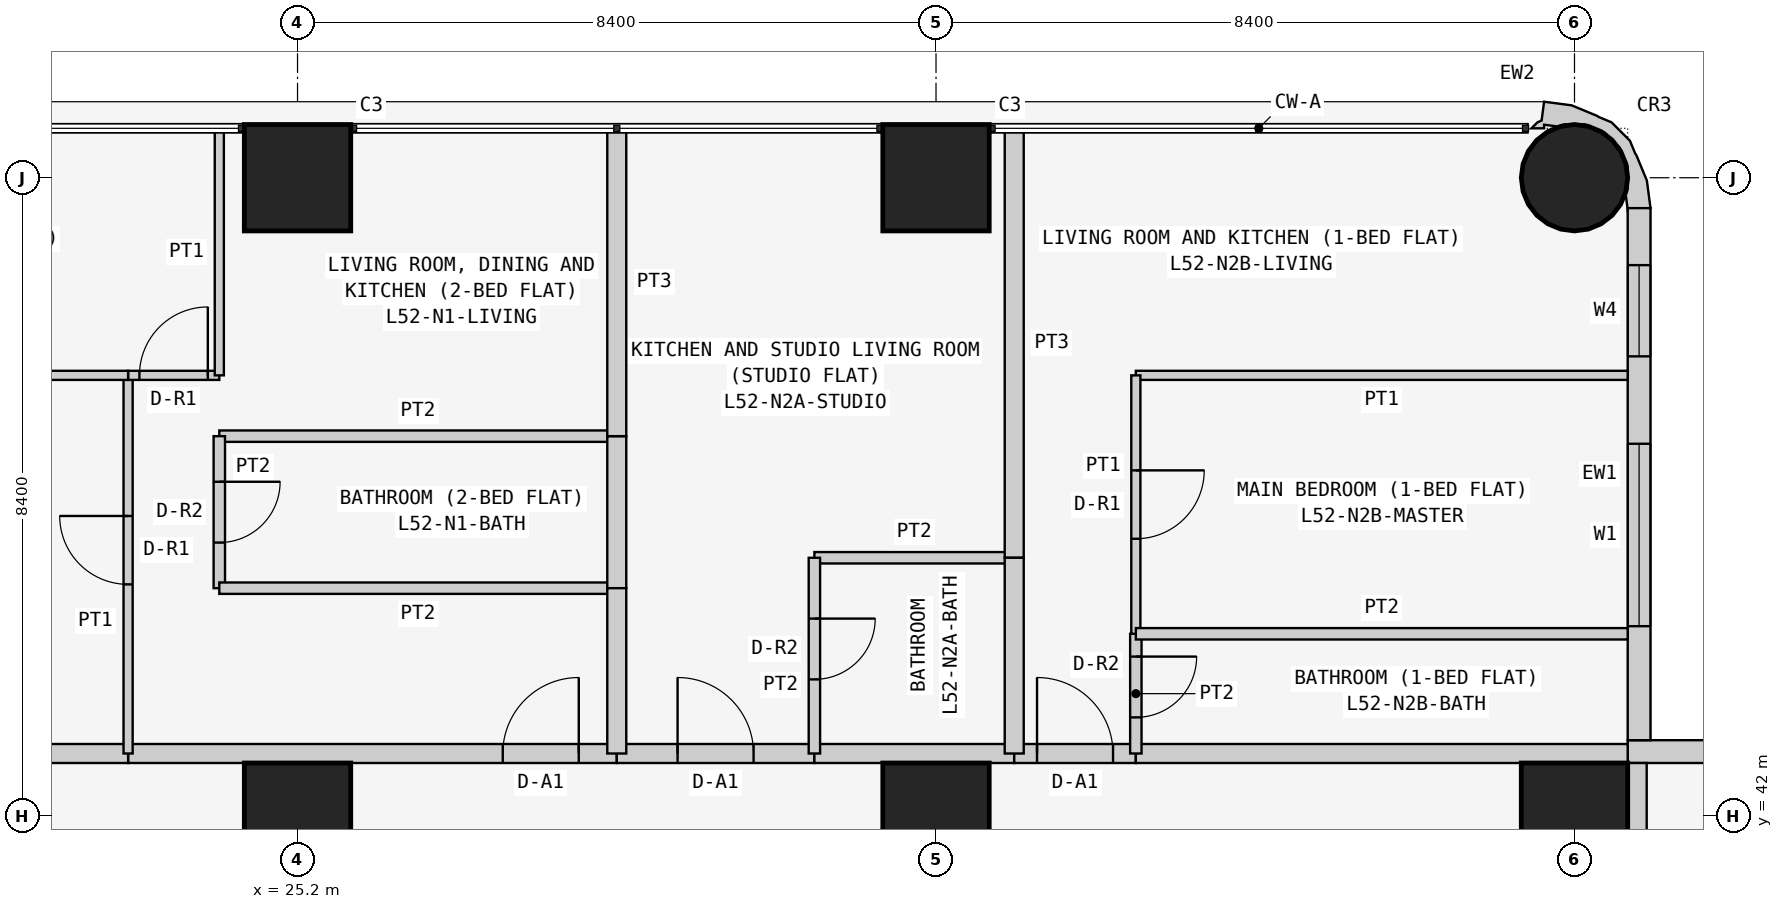
"""IFC4 building model, lengths in metres.
Left out: names, types, materials, properties, quantities, classifications, styles, units other than length and angle.
Written with IfcOpenShell. Run it as: python <this file> out.ifc"""

import sys

from ifc_helpers import new_model, si_unit, direction, frame, frame_2d, origin, origin_2d, place, context, subcontext, project, spatial, polyline, rectangle, circle, outline, extrude, element, fill, save


model = new_model("IFC4")
c1 = context("Model", 3, precision=1e-05, world=origin(), true_north=direction((0.0, 1.0)))
c2 = subcontext(c1, "Body", "Model", "MODEL_VIEW")
j1 = project(units=[si_unit("LENGTHUNIT", "METRE"), si_unit("PLANEANGLEUNIT", "RADIAN")], contexts=[c1])
p1 = place(None, origin())
s1 = spatial("IfcSite", under=j1, at=p1, CompositionType="ELEMENT")
p2 = place(p1, origin())
s2 = spatial("IfcBuilding", under=s1, at=p2, CompositionType="ELEMENT")
p3 = place(p2, frame((0.0, 0.0, 201.3)))
s3 = spatial("IfcBuildingStorey", under=s2, at=p3, CompositionType="ELEMENT", Elevation=201.3)
for number, where, z_axis, x_axis in (
    (1, (25.2, 42.0, 0.0), (0.0, 0.0, 1.0), (1.0, 0.0, 0.0)),
    (2, (25.2, 50.4, 0.0), (0.0, 0.0, 1.0), (1.0, 0.0, 0.0)),
    (3, (33.6, 42.0, 0.0), (0.0, 0.0, 1.0), (1.0, 0.0, 0.0)),
    (4, (33.6, 50.4, 0.0), (0.0, 0.0, 1.0), (1.0, 0.0, 0.0)),
    (5, (42.0, 42.0, 0.0), (0.0, 0.0, 1.0), (1.0, 0.0, 0.0)),
):
    element("IfcColumn", number, at=place(p3, frame(where, z_axis=z_axis, x_axis=x_axis)), inside=s3, PredefinedType="COLUMN", context=c2, shape_type="SweptSolid", body=[
        extrude(rectangle(XDim=1.4, YDim=1.4, at=origin_2d()), origin(), (0.0, 0.0, 1.0), 3.6),
    ])
p4 = place(p3, frame((42.0, 50.4, 0.0), z_axis=(0.0, 0.0, 1.0), x_axis=(1.0, 0.0, 0.0)))
e6 = element("IfcColumn", 6, at=p4, inside=s3, PredefinedType="COLUMN", context=c2, shape_type="SweptSolid", body=[
    extrude(circle(Radius=0.7, at=origin_2d()), origin(), (0.0, 0.0, 1.0), 3.6),
])
p5 = place(p3, frame((50.0, 42.85, 0.0), z_axis=(0.0, 0.0, 1.0), x_axis=(-1.0, 0.0, 0.0)))
e7 = element("IfcWall", 7, at=p5, inside=s3, PredefinedType="SOLIDWALL", context=c2, shape_type="SweptSolid", body=[
    extrude(rectangle(XDim=7.3, YDim=0.3, at=frame_2d((3.65, 0.0))), origin(), (0.0, 0.0, 1.0), 3.45),
])
p6 = place(p5, frame((3.1, 0.0, 0.9)))
e8 = element("IfcOpeningElement", 8, at=p6, cuts=e7, PredefinedType="OPENING", context=c2, shape_type="SweptSolid", body=[
    extrude(rectangle(XDim=2.4, YDim=1.5, at=frame_2d((1.2, 0.75))), frame((0.0, 0.16, 0.0), z_axis=(0.0, -1.0, 0.0), x_axis=(1.0, 0.0, 0.0)), (0.0, 0.0, 1.0), 0.32),
])
p7 = place(p5, frame((0.75, 0.0, 0.9)))
e9 = element("IfcOpeningElement", 9, at=p7, cuts=e7, PredefinedType="OPENING", context=c2, shape_type="SweptSolid", body=[
    extrude(rectangle(XDim=1.2, YDim=1.5, at=frame_2d((0.6, 0.75))), frame((0.0, 0.16, 0.0), z_axis=(0.0, -1.0, 0.0), x_axis=(1.0, 0.0, 0.0)), (0.0, 0.0, 1.0), 0.32),
])
p8 = place(p3, frame((42.85, 43.0, 0.0), z_axis=(0.0, 0.0, 1.0), x_axis=(0.0, 1.0, 0.0)))
e10 = element("IfcWall", 10, at=p8, inside=s3, PredefinedType="SOLIDWALL", context=c2, shape_type="SweptSolid", body=[
    extrude(rectangle(XDim=7.0, YDim=0.3, at=frame_2d((3.5, 0.0))), origin(), (0.0, 0.0, 1.0), 3.45),
])
p9 = place(p8, frame((1.5, 0.0, 0.9)))
e11 = element("IfcOpeningElement", 11, at=p9, cuts=e10, PredefinedType="OPENING", context=c2, shape_type="SweptSolid", body=[
    extrude(rectangle(XDim=2.4, YDim=1.5, at=frame_2d((1.2, 0.75))), frame((0.0, 0.16, 0.0), z_axis=(0.0, -1.0, 0.0), x_axis=(1.0, 0.0, 0.0)), (0.0, 0.0, 1.0), 0.32),
])
p10 = place(p8, frame((5.05, 0.0, 0.9)))
e12 = element("IfcOpeningElement", 12, at=p10, cuts=e10, PredefinedType="OPENING", context=c2, shape_type="SweptSolid", body=[
    extrude(rectangle(XDim=1.2, YDim=1.5, at=frame_2d((0.6, 0.75))), frame((0.0, 0.16, 0.0), z_axis=(0.0, -1.0, 0.0), x_axis=(1.0, 0.0, 0.0)), (0.0, 0.0, 1.0), 0.32),
])
p11 = place(p3, frame((42.724, 50.11, 0.0), z_axis=(0.0, 0.0, 1.0), x_axis=(0.439933741929, 0.898030234854, 0.0)))
e13 = element("IfcWall", 13, at=p11, inside=s3, PredefinedType="SOLIDWALL", context=c2, shape_type="SweptSolid", body=[
    extrude(outline(polyline([(-0.145, -0.044), (0.022, -0.296), (0.327, -0.094), (0.568, 0.18), (0.577, 0.199), (0.7, 0.337), (0.811, 0.661), (0.799, 0.845), (0.803, 0.866), (0.78, 1.231), (0.664, 1.577), (0.426, 1.497), (0.382, 1.536), (0.276, 1.572), (0.349, 1.423), (0.392, 1.444), (0.453, 1.261), (0.51, 1.211), (0.632, 0.961), (0.65, 0.683), (0.56, 0.419), (0.375, 0.21), (0.125, 0.087), (0.05, 0.082), (-0.127, -0.035), (-0.145, -0.044)])), origin(), (0.0, 0.0, 1.0), 3.45),
])
p12 = place(p3, frame((22.971, 42.825, 0.0), z_axis=(0.0, 0.0, 1.0), x_axis=(1.0, 0.0, 0.0)))
e14 = element("IfcWall", 14, at=p12, inside=s3, PredefinedType="PARTITIONING", context=c2, shape_type="SweptSolid", body=[
    extrude(rectangle(XDim=6.429, YDim=0.25, at=frame_2d((3.214, 0.0))), origin(), (0.0, 0.0, 1.0), 3.45),
])
p13 = place(p12, frame((4.929, 0.0, 0.0)))
e15 = element("IfcOpeningElement", 15, at=p13, cuts=e14, PredefinedType="OPENING", context=c2, shape_type="SweptSolid", body=[
    extrude(rectangle(XDim=1.0, YDim=2.1, at=frame_2d((0.5, 1.05))), frame((0.0, 0.135, 0.0), z_axis=(0.0, -1.0, 0.0), x_axis=(1.0, 0.0, 0.0)), (0.0, 0.0, 1.0), 0.27),
])
p14 = place(p3, frame((16.1, 42.825, 0.0), z_axis=(0.0, 0.0, 1.0), x_axis=(1.0, 0.0, 0.0)))
e16 = element("IfcWall", 16, at=p14, inside=s3, PredefinedType="PARTITIONING", context=c2, shape_type="SweptSolid", body=[
    extrude(rectangle(XDim=6.871, YDim=0.25, at=frame_2d((3.436, 0.0))), origin(), (0.0, 0.0, 1.0), 3.45),
])
p15 = place(p3, frame((29.4, 42.825, 0.0), z_axis=(0.0, 0.0, 1.0), x_axis=(1.0, 0.0, 0.0)))
e17 = element("IfcWall", 17, at=p15, inside=s3, PredefinedType="PARTITIONING", context=c2, shape_type="SweptSolid", body=[
    extrude(rectangle(XDim=2.6, YDim=0.25, at=frame_2d((1.3, 0.0))), origin(), (0.0, 0.0, 1.0), 3.45),
])
p16 = place(p15, frame((0.8, 0.0, 0.0)))
e18 = element("IfcOpeningElement", 18, at=p16, cuts=e17, PredefinedType="OPENING", context=c2, shape_type="SweptSolid", body=[
    extrude(rectangle(XDim=1.0, YDim=2.1, at=frame_2d((0.5, 1.05))), frame((0.0, 0.135, 0.0), z_axis=(0.0, -1.0, 0.0), x_axis=(1.0, 0.0, 0.0)), (0.0, 0.0, 1.0), 0.27),
])
p17 = place(p3, frame((32.0, 42.825, 0.0), z_axis=(0.0, 0.0, 1.0), x_axis=(1.0, 0.0, 0.0)))
e19 = element("IfcWall", 19, at=p17, inside=s3, PredefinedType="PARTITIONING", context=c2, shape_type="SweptSolid", body=[
    extrude(rectangle(XDim=2.629, YDim=0.25, at=frame_2d((1.314, 0.0))), origin(), (0.0, 0.0, 1.0), 3.45),
])
p18 = place(p3, frame((34.629, 42.825, 0.0), z_axis=(0.0, 0.0, 1.0), x_axis=(1.0, 0.0, 0.0)))
e20 = element("IfcWall", 20, at=p18, inside=s3, PredefinedType="PARTITIONING", context=c2, shape_type="SweptSolid", body=[
    extrude(rectangle(XDim=1.6, YDim=0.25, at=frame_2d((0.8, 0.0))), origin(), (0.0, 0.0, 1.0), 3.45),
])
p19 = place(p18, frame((0.3, 0.0, 0.0)))
e21 = element("IfcOpeningElement", 21, at=p19, cuts=e20, PredefinedType="OPENING", context=c2, shape_type="SweptSolid", body=[
    extrude(rectangle(XDim=1.0, YDim=2.1, at=frame_2d((0.5, 1.05))), frame((0.0, 0.135, 0.0), z_axis=(0.0, -1.0, 0.0), x_axis=(1.0, 0.0, 0.0)), (0.0, 0.0, 1.0), 0.27),
])
p20 = place(p3, frame((36.229, 42.825, 0.0), z_axis=(0.0, 0.0, 1.0), x_axis=(1.0, 0.0, 0.0)))
e22 = element("IfcWall", 22, at=p20, inside=s3, PredefinedType="PARTITIONING", context=c2, shape_type="SweptSolid", body=[
    extrude(rectangle(XDim=6.471, YDim=0.25, at=frame_2d((3.235, 0.0))), origin(), (0.0, 0.0, 1.0), 3.45),
])
p21 = place(p3, frame((42.825, 42.7, 0.0), z_axis=(0.0, 0.0, 1.0), x_axis=(0.0, -1.0, 0.0)))
e23 = element("IfcWall", 23, at=p21, inside=s3, PredefinedType="PARTITIONING", context=c2, shape_type="SweptSolid", body=[
    extrude(rectangle(XDim=6.871, YDim=0.25, at=frame_2d((3.436, 0.0))), origin(), (0.0, 0.0, 1.0), 3.45),
])
p22 = place(p3, frame((29.4, 47.0, 0.0), z_axis=(0.0, 0.0, 1.0), x_axis=(-1.0, 0.0, 0.0)))
e24 = element("IfcWall", 24, at=p22, inside=s3, PredefinedType="PARTITIONING", context=c2, shape_type="SweptSolid", body=[
    extrude(rectangle(XDim=5.229, YDim=0.15, at=frame_2d((2.615, 0.0))), origin(), (0.0, 0.0, 1.0), 3.45),
])
p23 = place(p3, frame((24.171, 47.0, 0.0), z_axis=(0.0, 0.0, 1.0), x_axis=(0.0, -1.0, 0.0)))
e25 = element("IfcWall", 25, at=p23, inside=s3, PredefinedType="PARTITIONING", context=c2, shape_type="SweptSolid", body=[
    extrude(rectangle(XDim=2.0, YDim=0.15, at=frame_2d((1.0, 0.0))), origin(), (0.0, 0.0, 1.0), 3.45),
])
p24 = place(p23, frame((0.6, 0.0, 0.0)))
e26 = element("IfcOpeningElement", 26, at=p24, cuts=e25, PredefinedType="OPENING", context=c2, shape_type="SweptSolid", body=[
    extrude(rectangle(XDim=0.8, YDim=2.1, at=frame_2d((0.4, 1.05))), frame((0.0, 0.085, 0.0), z_axis=(0.0, -1.0, 0.0), x_axis=(1.0, 0.0, 0.0)), (0.0, 0.0, 1.0), 0.17),
])
p25 = place(p3, frame((24.171, 45.0, 0.0), z_axis=(0.0, 0.0, 1.0), x_axis=(1.0, 0.0, 0.0)))
e27 = element("IfcWall", 27, at=p25, inside=s3, PredefinedType="PARTITIONING", context=c2, shape_type="SweptSolid", body=[
    extrude(rectangle(XDim=5.229, YDim=0.15, at=frame_2d((2.615, 0.0))), origin(), (0.0, 0.0, 1.0), 3.45),
])
p26 = place(p3, frame((29.4, 45.0, 0.0), z_axis=(0.0, 0.0, 1.0), x_axis=(0.0, 1.0, 0.0)))
e28 = element("IfcWall", 28, at=p26, inside=s3, PredefinedType="PARTITIONING", context=c2, shape_type="SweptSolid", body=[
    extrude(rectangle(XDim=2.0, YDim=0.25, at=frame_2d((1.0, 0.0))), origin(), (0.0, 0.0, 1.0), 2.848),
])
p27 = place(p3, frame((22.971, 42.825, 0.0), z_axis=(0.0, 0.0, 1.0), x_axis=(0.0, 1.0, 0.0)))
e29 = element("IfcWall", 29, at=p27, inside=s3, PredefinedType="PARTITIONING", context=c2, shape_type="SweptSolid", body=[
    extrude(rectangle(XDim=4.975, YDim=0.12, at=frame_2d((2.488, 0.0))), origin(), (0.0, 0.0, 1.0), 3.45),
])
p28 = place(p27, frame((2.225, 0.0, 0.0)))
e30 = element("IfcOpeningElement", 30, at=p28, cuts=e29, PredefinedType="OPENING", context=c2, shape_type="SweptSolid", body=[
    extrude(rectangle(XDim=0.9, YDim=2.1, at=frame_2d((0.45, 1.05))), frame((0.0, 0.07, 0.0), z_axis=(0.0, -1.0, 0.0), x_axis=(1.0, 0.0, 0.0)), (0.0, 0.0, 1.0), 0.14),
])
p29 = place(p3, frame((22.971, 47.8, 0.0), z_axis=(0.0, 0.0, 1.0), x_axis=(1.0, 0.0, 0.0)))
e31 = element("IfcWall", 31, at=p29, inside=s3, PredefinedType="PARTITIONING", context=c2, shape_type="SweptSolid", body=[
    extrude(rectangle(XDim=1.2, YDim=0.12, at=frame_2d((0.6, 0.0))), origin(), (0.0, 0.0, 1.0), 3.45),
])
p30 = place(p29, frame((0.149, 0.0, 0.0)))
e32 = element("IfcOpeningElement", 32, at=p30, cuts=e31, PredefinedType="OPENING", context=c2, shape_type="SweptSolid", body=[
    extrude(rectangle(XDim=0.9, YDim=2.1, at=frame_2d((0.45, 1.05))), frame((0.0, 0.07, 0.0), z_axis=(0.0, -1.0, 0.0), x_axis=(1.0, 0.0, 0.0)), (0.0, 0.0, 1.0), 0.14),
])
p31 = place(p3, frame((24.171, 47.8, 0.0), z_axis=(0.0, 0.0, 1.0), x_axis=(0.0, 1.0, 0.0)))
e33 = element("IfcWall", 33, at=p31, inside=s3, PredefinedType="PARTITIONING", context=c2, shape_type="SweptSolid", body=[
    extrude(rectangle(XDim=3.25, YDim=0.12, at=frame_2d((1.625, 0.0))), origin(), (0.0, 0.0, 1.0), 3.45),
])
p32 = place(p3, frame((29.4, 45.0, 0.0), z_axis=(0.0, 0.0, 1.0), x_axis=(0.0, -1.0, 0.0)))
e34 = element("IfcWall", 34, at=p32, inside=s3, PredefinedType="PARTITIONING", context=c2, shape_type="SweptSolid", body=[
    extrude(rectangle(XDim=2.175, YDim=0.25, at=frame_2d((1.087, 0.0))), origin(), (0.0, 0.0, 1.0), 2.848),
])
p33 = place(p3, frame((29.4, 51.05, 0.0), z_axis=(0.0, 0.0, 1.0), x_axis=(0.0, -1.0, 0.0)))
e35 = element("IfcWall", 35, at=p33, inside=s3, PredefinedType="PARTITIONING", context=c2, shape_type="SweptSolid", body=[
    extrude(rectangle(XDim=4.05, YDim=0.25, at=frame_2d((2.025, 0.0))), origin(), (0.0, 0.0, 1.0), 2.848),
])
p34 = place(p3, frame((22.971, 47.8, 0.0), z_axis=(0.0, 0.0, 1.0), x_axis=(-1.0, 0.0, 0.0)))
e36 = element("IfcWall", 36, at=p34, inside=s3, PredefinedType="PARTITIONING", context=c2, shape_type="SweptSolid", body=[
    extrude(rectangle(XDim=6.871, YDim=0.12, at=frame_2d((3.436, 0.0))), origin(), (0.0, 0.0, 1.0), 3.45),
])
p35 = place(p3, frame((34.629, 45.4, 0.0), z_axis=(0.0, 0.0, 1.0), x_axis=(-1.0, 0.0, 0.0)))
e37 = element("IfcWall", 37, at=p35, inside=s3, PredefinedType="PARTITIONING", context=c2, shape_type="SweptSolid", body=[
    extrude(rectangle(XDim=2.629, YDim=0.15, at=frame_2d((1.314, 0.0))), origin(), (0.0, 0.0, 1.0), 3.45),
])
p36 = place(p3, frame((32.0, 45.4, 0.0), z_axis=(0.0, 0.0, 1.0), x_axis=(0.0, -1.0, 0.0)))
e38 = element("IfcWall", 38, at=p36, inside=s3, PredefinedType="PARTITIONING", context=c2, shape_type="SweptSolid", body=[
    extrude(rectangle(XDim=2.575, YDim=0.15, at=frame_2d((1.288, 0.0))), origin(), (0.0, 0.0, 1.0), 3.45),
])
p37 = place(p36, frame((0.8, 0.0, 0.0)))
e39 = element("IfcOpeningElement", 39, at=p37, cuts=e38, PredefinedType="OPENING", context=c2, shape_type="SweptSolid", body=[
    extrude(rectangle(XDim=0.8, YDim=2.1, at=frame_2d((0.4, 1.05))), frame((0.0, 0.085, 0.0), z_axis=(0.0, -1.0, 0.0), x_axis=(1.0, 0.0, 0.0)), (0.0, 0.0, 1.0), 0.17),
])
p38 = place(p3, frame((34.629, 51.05, 0.0), z_axis=(0.0, 0.0, 1.0), x_axis=(0.0, -1.0, 0.0)))
e40 = element("IfcWall", 40, at=p38, inside=s3, PredefinedType="PARTITIONING", context=c2, shape_type="SweptSolid", body=[
    extrude(rectangle(XDim=5.65, YDim=0.25, at=frame_2d((2.825, 0.0))), origin(), (0.0, 0.0, 1.0), 3.45),
])
p39 = place(p3, frame((34.629, 45.4, 0.0), z_axis=(0.0, 0.0, 1.0), x_axis=(0.0, -1.0, 0.0)))
e41 = element("IfcWall", 41, at=p39, inside=s3, PredefinedType="PARTITIONING", context=c2, shape_type="SweptSolid", body=[
    extrude(rectangle(XDim=2.575, YDim=0.25, at=frame_2d((1.288, 0.0))), origin(), (0.0, 0.0, 1.0), 3.45),
])
p40 = place(p3, frame((36.229, 44.4, 0.0), z_axis=(0.0, 0.0, 1.0), x_axis=(0.0, -1.0, 0.0)))
e42 = element("IfcWall", 42, at=p40, inside=s3, PredefinedType="PARTITIONING", context=c2, shape_type="SweptSolid", body=[
    extrude(rectangle(XDim=1.575, YDim=0.15, at=frame_2d((0.788, 0.0))), origin(), (0.0, 0.0, 1.0), 3.45),
])
p41 = place(p40, frame((0.3, 0.0, 0.0)))
e43 = element("IfcOpeningElement", 43, at=p41, cuts=e42, PredefinedType="OPENING", context=c2, shape_type="SweptSolid", body=[
    extrude(rectangle(XDim=0.8, YDim=2.1, at=frame_2d((0.4, 1.05))), frame((0.0, 0.085, 0.0), z_axis=(0.0, -1.0, 0.0), x_axis=(1.0, 0.0, 0.0)), (0.0, 0.0, 1.0), 0.17),
])
p42 = place(p3, frame((42.7, 47.8, 0.0), z_axis=(0.0, 0.0, 1.0), x_axis=(-1.0, 0.0, 0.0)))
e44 = element("IfcWall", 44, at=p42, inside=s3, PredefinedType="PARTITIONING", context=c2, shape_type="SweptSolid", body=[
    extrude(rectangle(XDim=6.471, YDim=0.12, at=frame_2d((3.235, 0.0))), origin(), (0.0, 0.0, 1.0), 3.45),
])
p43 = place(p3, frame((36.229, 47.8, 0.0), z_axis=(0.0, 0.0, 1.0), x_axis=(0.0, -1.0, 0.0)))
e45 = element("IfcWall", 45, at=p43, inside=s3, PredefinedType="PARTITIONING", context=c2, shape_type="SweptSolid", body=[
    extrude(rectangle(XDim=3.4, YDim=0.12, at=frame_2d((1.7, 0.0))), origin(), (0.0, 0.0, 1.0), 3.45),
])
p44 = place(p43, frame((1.25, 0.0, 0.0)))
e46 = element("IfcOpeningElement", 46, at=p44, cuts=e45, PredefinedType="OPENING", context=c2, shape_type="SweptSolid", body=[
    extrude(rectangle(XDim=0.9, YDim=2.1, at=frame_2d((0.45, 1.05))), frame((0.0, 0.07, 0.0), z_axis=(0.0, -1.0, 0.0), x_axis=(1.0, 0.0, 0.0)), (0.0, 0.0, 1.0), 0.14),
])
p45 = place(p3, frame((36.229, 44.4, 0.0), z_axis=(0.0, 0.0, 1.0), x_axis=(1.0, 0.0, 0.0)))
e47 = element("IfcWall", 47, at=p45, inside=s3, PredefinedType="PARTITIONING", context=c2, shape_type="SweptSolid", body=[
    extrude(rectangle(XDim=6.471, YDim=0.15, at=frame_2d((3.235, 0.0))), origin(), (0.0, 0.0, 1.0), 3.45),
])
p46 = place(p9, origin())
e48 = element("IfcWindow", 48, at=p46, inside=s3, PartitioningType="SINGLE_PANEL", PredefinedType="WINDOW", context=c2, shape_type="SweptSolid", body=[
    extrude(rectangle(XDim=2.4, YDim=1.5, at=frame_2d((1.2, 0.75))), frame((0.0, 0.03, 0.0), z_axis=(0.0, -1.0, 0.0), x_axis=(1.0, 0.0, 0.0)), (0.0, 0.0, 1.0), 0.06),
])
fill(e11, e48)
p47 = place(p10, origin())
e49 = element("IfcWindow", 49, at=p47, inside=s3, PartitioningType="SINGLE_PANEL", PredefinedType="WINDOW", context=c2, shape_type="SweptSolid", body=[
    extrude(rectangle(XDim=1.2, YDim=1.5, at=frame_2d((0.6, 0.75))), frame((0.0, 0.03, 0.0), z_axis=(0.0, -1.0, 0.0), x_axis=(1.0, 0.0, 0.0)), (0.0, 0.0, 1.0), 0.06),
])
fill(e12, e49)
p48 = place(p13, origin())
e50 = element("IfcDoor", 50, at=p48, inside=s3, OperationType="SINGLE_SWING_RIGHT", PredefinedType="DOOR", context=c2, shape_type="SweptSolid", body=[
    extrude(rectangle(XDim=1.0, YDim=2.1, at=frame_2d((0.5, 1.05))), frame((0.0, 0.025, 0.0), z_axis=(0.0, -1.0, 0.0), x_axis=(1.0, 0.0, 0.0)), (0.0, 0.0, 1.0), 0.05),
])
fill(e15, e50)
p49 = place(p24, origin())
e51 = element("IfcDoor", 51, at=p49, inside=s3, OperationType="SINGLE_SWING_LEFT", PredefinedType="DOOR", context=c2, shape_type="SweptSolid", body=[
    extrude(rectangle(XDim=0.8, YDim=2.1, at=frame_2d((0.4, 1.05))), frame((0.0, 0.025, 0.0), z_axis=(0.0, -1.0, 0.0), x_axis=(1.0, 0.0, 0.0)), (0.0, 0.0, 1.0), 0.05),
])
fill(e26, e51)
p50 = place(p28, origin())
e52 = element("IfcDoor", 52, at=p50, inside=s3, OperationType="SINGLE_SWING_RIGHT", PredefinedType="DOOR", context=c2, shape_type="SweptSolid", body=[
    extrude(rectangle(XDim=0.9, YDim=2.1, at=frame_2d((0.45, 1.05))), frame((0.0, 0.025, 0.0), z_axis=(0.0, -1.0, 0.0), x_axis=(1.0, 0.0, 0.0)), (0.0, 0.0, 1.0), 0.05),
])
fill(e30, e52)
p51 = place(p30, origin())
e53 = element("IfcDoor", 53, at=p51, inside=s3, OperationType="SINGLE_SWING_RIGHT", PredefinedType="DOOR", context=c2, shape_type="SweptSolid", body=[
    extrude(rectangle(XDim=0.9, YDim=2.1, at=frame_2d((0.45, 1.05))), frame((0.0, 0.025, 0.0), z_axis=(0.0, -1.0, 0.0), x_axis=(1.0, 0.0, 0.0)), (0.0, 0.0, 1.0), 0.05),
])
fill(e32, e53)
p52 = place(p16, origin())
e54 = element("IfcDoor", 54, at=p52, inside=s3, OperationType="SINGLE_SWING_LEFT", PredefinedType="DOOR", context=c2, shape_type="SweptSolid", body=[
    extrude(rectangle(XDim=1.0, YDim=2.1, at=frame_2d((0.5, 1.05))), frame((0.0, 0.025, 0.0), z_axis=(0.0, -1.0, 0.0), x_axis=(1.0, 0.0, 0.0)), (0.0, 0.0, 1.0), 0.05),
])
fill(e18, e54)
p53 = place(p37, origin())
e55 = element("IfcDoor", 55, at=p53, inside=s3, OperationType="SINGLE_SWING_LEFT", PredefinedType="DOOR", context=c2, shape_type="SweptSolid", body=[
    extrude(rectangle(XDim=0.8, YDim=2.1, at=frame_2d((0.4, 1.05))), frame((0.0, 0.025, 0.0), z_axis=(0.0, -1.0, 0.0), x_axis=(1.0, 0.0, 0.0)), (0.0, 0.0, 1.0), 0.05),
])
fill(e39, e55)
p54 = place(p19, origin())
e56 = element("IfcDoor", 56, at=p54, inside=s3, OperationType="SINGLE_SWING_LEFT", PredefinedType="DOOR", context=c2, shape_type="SweptSolid", body=[
    extrude(rectangle(XDim=1.0, YDim=2.1, at=frame_2d((0.5, 1.05))), frame((0.0, 0.025, 0.0), z_axis=(0.0, -1.0, 0.0), x_axis=(1.0, 0.0, 0.0)), (0.0, 0.0, 1.0), 0.05),
])
fill(e21, e56)
p55 = place(p41, origin())
e57 = element("IfcDoor", 57, at=p55, inside=s3, OperationType="SINGLE_SWING_LEFT", PredefinedType="DOOR", context=c2, shape_type="SweptSolid", body=[
    extrude(rectangle(XDim=0.8, YDim=2.1, at=frame_2d((0.4, 1.05))), frame((0.0, 0.025, 0.0), z_axis=(0.0, -1.0, 0.0), x_axis=(1.0, 0.0, 0.0)), (0.0, 0.0, 1.0), 0.05),
])
fill(e43, e57)
p56 = place(p44, origin())
e58 = element("IfcDoor", 58, at=p56, inside=s3, OperationType="SINGLE_SWING_LEFT", PredefinedType="DOOR", context=c2, shape_type="SweptSolid", body=[
    extrude(rectangle(XDim=0.9, YDim=2.1, at=frame_2d((0.45, 1.05))), frame((0.0, 0.025, 0.0), z_axis=(0.0, -1.0, 0.0), x_axis=(1.0, 0.0, 0.0)), (0.0, 0.0, 1.0), 0.05),
])
fill(e46, e58)
save(model, sys.argv[1])
